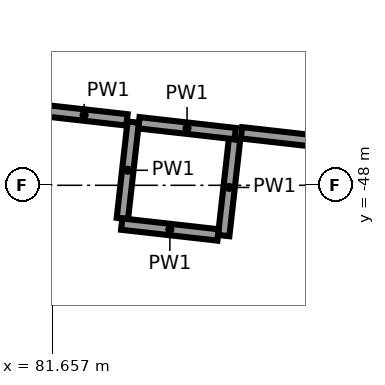
"""IFC4 building model, lengths in metres.
Left out: names, types, materials, properties, quantities, classifications, styles, units other than length and angle.
Written with IfcOpenShell. Run it as: python <this file> out.ifc"""

import sys

from ifc_helpers import new_model, si_unit, direction, frame, frame_2d, origin, place, context, subcontext, project, spatial, rectangle, extrude, element, save


model = new_model("IFC4")
c1 = context("Model", 3, precision=1e-05, world=origin(), true_north=direction((0.0, 1.0)))
c2 = subcontext(c1, "Body", "Model", "MODEL_VIEW")
j1 = project(units=[si_unit("LENGTHUNIT", "METRE"), si_unit("PLANEANGLEUNIT", "RADIAN")], contexts=[c1])
p1 = place(None, origin())
s1 = spatial("IfcSite", under=j1, at=p1, CompositionType="ELEMENT")
p2 = place(p1, origin())
s2 = spatial("IfcBuilding", under=s1, at=p2, CompositionType="ELEMENT")
p3 = place(p2, frame((0.0, 0.0, 6.5)))
s3 = spatial("IfcBuildingStorey", under=s2, at=p3, CompositionType="ELEMENT", Elevation=6.5)
for number, where, z_axis, x_axis in (
    (1, (83.913, -48.662, 0.0), (0.0, 0.0, 1.0), (0.112, 0.994, 0.0)),
    (2, (84.064, -47.32, 0.0), (0.0, 0.0, 1.0), (-0.994, 0.112, 0.0)),
):
    element("IfcWall", number, at=place(p3, frame(where, z_axis=z_axis, x_axis=x_axis)), inside=s3, PredefinedType="PARTITIONING", context=c2, shape_type="SweptSolid", body=[
        extrude(rectangle(XDim=1.275, YDim=0.15, at=frame_2d((0.638, 0.0))), origin(), (0.0, 0.0, 1.0), 5.15),
    ])
for number, where, z_axis, x_axis in (
    (3, (82.723, -47.169, 0.0), (0.0, 0.0, 1.0), (-0.112, -0.994, 0.0)),
    (4, (82.572, -48.51, 0.0), (0.0, 0.0, 1.0), (0.994, -0.112, 0.0)),
):
    element("IfcWall", number, at=place(p3, frame(where, z_axis=z_axis, x_axis=x_axis)), inside=s3, PredefinedType="PARTITIONING", context=c2, shape_type="SweptSolid", body=[
        extrude(rectangle(XDim=1.275, YDim=0.15, at=frame_2d((0.637, 0.0))), origin(), (0.0, 0.0, 1.0), 5.15),
    ])
p4 = place(p3, frame((82.641, -47.139, 0.0), z_axis=(0.0, 0.0, 1.0), x_axis=(-0.993725340882, 0.111847873866, 0.0)))
e5 = element("IfcWall", 5, at=p4, inside=s3, PredefinedType="PARTITIONING", context=c2, shape_type="SweptSolid", body=[
    extrude(rectangle(XDim=1.135, YDim=0.15, at=frame_2d((0.567, 0.0))), origin(), (0.0, 0.0, 1.0), 5.15),
])
p5 = place(p3, frame((87.827, -47.724, 0.0), z_axis=(0.0, 0.0, 1.0), x_axis=(-0.993708869306, 0.11199412066, 0.0)))
e6 = element("IfcWall", 6, at=p5, inside=s3, PredefinedType="PARTITIONING", context=c2, shape_type="SweptSolid", body=[
    extrude(rectangle(XDim=3.704, YDim=0.15, at=frame_2d((1.852, 0.0))), origin(), (0.0, 0.0, 1.0), 4.05),
])
p6 = place(p5, frame((0.65, 0.0, 0.0)))
e7 = element("IfcOpeningElement", 7, at=p6, cuts=e6, PredefinedType="OPENING", context=c2, shape_type="SweptSolid", body=[
    extrude(rectangle(XDim=1.8, YDim=2.1, at=frame_2d((0.9, 1.05))), frame((0.0, 0.085, 0.0), z_axis=(0.0, -1.0, 0.0), x_axis=(1.0, 0.0, 0.0)), (0.0, 0.0, 1.0), 0.17),
])
save(model, sys.argv[1])
